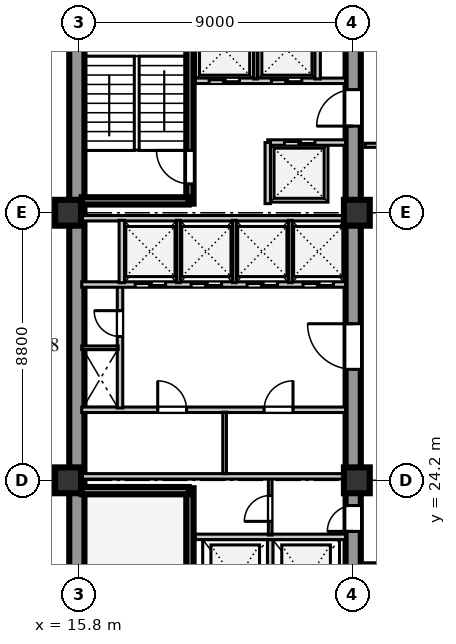
"""IFC4 building model, lengths in metres.
Left out: names, types, materials, properties, quantities, classifications, styles, units other than length and angle.
Written with IfcOpenShell. Run it as: python <this file> out.ifc"""

import sys

from ifc_helpers import new_model, si_unit, direction, frame, frame_2d, origin, origin_2d, place, context, subcontext, project, spatial, rectangle, extrude, element, fill, save


model = new_model("IFC4")
c1 = context("Model", 3, precision=1e-05, world=origin(), true_north=direction((0.0, 1.0)))
c2 = subcontext(c1, "Body", "Model", "MODEL_VIEW")
j1 = project(units=[si_unit("LENGTHUNIT", "METRE"), si_unit("PLANEANGLEUNIT", "RADIAN")], contexts=[c1])
p1 = place(None, origin())
s1 = spatial("IfcSite", under=j1, at=p1, CompositionType="ELEMENT")
p2 = place(p1, origin())
s2 = spatial("IfcBuilding", under=s1, at=p2, CompositionType="ELEMENT")
p3 = place(p2, frame((0.0, 0.0, 188.7)))
s3 = spatial("IfcBuildingStorey", under=s2, at=p3, CompositionType="ELEMENT", Elevation=188.7)
p4 = place(p3, frame((15.74, 15.81, 0.0), z_axis=(0.0, 0.0, 1.0), x_axis=(0.0, 1.0, 0.0)))
e1 = element("IfcWall", 1, at=p4, inside=s3, PredefinedType="SHEAR", context=c2, shape_type="SweptSolid", body=[
    extrude(rectangle(XDim=25.63, YDim=0.5, at=frame_2d((12.815, 0.0))), origin(), (0.0, 0.0, 1.0), 3.6),
])
p5 = place(p3, frame((24.83, 15.74, 0.0), z_axis=(0.0, 0.0, 1.0), x_axis=(0.0, 1.0, 0.0)))
e2 = element("IfcWall", 2, at=p5, inside=s3, PredefinedType="SHEAR", context=c2, shape_type="SweptSolid", body=[
    extrude(rectangle(XDim=25.76, YDim=0.5, at=frame_2d((12.88, 0.0))), origin(), (0.0, 0.0, 1.0), 3.6),
])
p6 = place(p5, frame((1.61, 0.0, 0.0)))
e3 = element("IfcOpeningElement", 3, at=p6, cuts=e2, PredefinedType="OPENING", context=c2, shape_type="SweptSolid", body=[
    extrude(rectangle(XDim=1.2, YDim=2.1, at=frame_2d((0.6, 1.05))), frame((0.0, 0.26, 0.0), z_axis=(0.0, -1.0, 0.0), x_axis=(1.0, 0.0, 0.0)), (0.0, 0.0, 1.0), 0.52),
])
p7 = place(p5, frame((6.78, 0.0, 0.0)))
e4 = element("IfcOpeningElement", 4, at=p7, cuts=e2, PredefinedType="OPENING", context=c2, shape_type="SweptSolid", body=[
    extrude(rectangle(XDim=0.85, YDim=2.06, at=frame_2d((0.425, 1.03))), frame((0.0, 0.26, 0.0), z_axis=(0.0, -1.0, 0.0), x_axis=(1.0, 0.0, 0.0)), (0.0, 0.0, 1.0), 0.52),
])
p8 = place(p5, frame((12.11, 0.0, 0.0)))
e5 = element("IfcOpeningElement", 5, at=p8, cuts=e2, PredefinedType="OPENING", context=c2, shape_type="SweptSolid", body=[
    extrude(rectangle(XDim=1.5, YDim=2.12, at=frame_2d((0.75, 1.06))), frame((0.0, 0.26, 0.0), z_axis=(0.0, -1.0, 0.0), x_axis=(1.0, 0.0, 0.0)), (0.0, 0.0, 1.0), 0.52),
])
p9 = place(p5, frame((20.11, 0.0, 0.0)))
e6 = element("IfcOpeningElement", 6, at=p9, cuts=e2, PredefinedType="OPENING", context=c2, shape_type="SweptSolid", body=[
    extrude(rectangle(XDim=1.2, YDim=2.12, at=frame_2d((0.6, 1.06))), frame((0.0, 0.26, 0.0), z_axis=(0.0, -1.0, 0.0), x_axis=(1.0, 0.0, 0.0)), (0.0, 0.0, 1.0), 0.52),
])
p10 = place(p5, frame((24.01, 0.0, 0.0)))
e7 = element("IfcOpeningElement", 7, at=p10, cuts=e2, PredefinedType="OPENING", context=c2, shape_type="SweptSolid", body=[
    extrude(rectangle(XDim=0.95, YDim=2.1, at=frame_2d((0.475, 1.05))), frame((0.0, 0.26, 0.0), z_axis=(0.0, -1.0, 0.0), x_axis=(1.0, 0.0, 0.0)), (0.0, 0.0, 1.0), 0.52),
])
for number, where, z_axis, x_axis in (
    (8, (15.45, 24.2, 0.0), (0.0, 0.0, 1.0), (1.0, 0.0, 0.0)),
    (9, (15.45, 33.0, 0.0), (0.0, 0.0, 1.0), (1.0, 0.0, 0.0)),
    (10, (24.95, 24.2, 0.0), (0.0, 0.0, 1.0), (1.0, 0.0, 0.0)),
    (11, (24.95, 33.0, 0.0), (0.0, 0.0, 1.0), (1.0, 0.0, 0.0)),
):
    element("IfcColumn", number, at=place(p3, frame(where, z_axis=z_axis, x_axis=x_axis)), inside=s3, PredefinedType="COLUMN", context=c2, shape_type="SweptSolid", body=[
        extrude(rectangle(XDim=0.85, YDim=0.85, at=origin_2d()), origin(), (0.0, 0.0, 1.0), 3.6),
    ])
p11 = place(p3, frame((19.46, 15.74, 0.0), z_axis=(0.0, 0.0, 1.0), x_axis=(0.0, 1.0, 0.0)))
e12 = element("IfcWall", 12, at=p11, inside=s3, PredefinedType="SHEAR", context=c2, shape_type="SweptSolid", body=[
    extrude(rectangle(XDim=8.2, YDim=0.24, at=frame_2d((4.1, 0.0))), origin(), (0.0, 0.0, 1.0), 3.85),
])
p12 = place(p11, frame((0.45, 0.0, 0.0)))
e13 = element("IfcOpeningElement", 13, at=p12, cuts=e12, PredefinedType="OPENING", context=c2, shape_type="SweptSolid", body=[
    extrude(rectangle(XDim=1.1, YDim=2.1, at=frame_2d((0.55, 1.05))), frame((0.0, 0.13, 0.0), z_axis=(0.0, -1.0, 0.0), x_axis=(1.0, 0.0, 0.0)), (0.0, 0.0, 1.0), 0.26),
])
p13 = place(p3, frame((15.9, 23.86, 0.0), z_axis=(0.0, 0.0, 1.0), x_axis=(1.0, 0.0, 0.0)))
e14 = element("IfcWall", 14, at=p13, inside=s3, PredefinedType="SHEAR", context=c2, shape_type="SweptSolid", body=[
    extrude(rectangle(XDim=3.52, YDim=0.24, at=frame_2d((1.76, 0.0))), origin(), (0.0, 0.0, 1.0), 3.85),
])
p14 = place(p3, frame((22.1, 19.51, 0.0), z_axis=(0.0, 0.0, 1.0), x_axis=(0.0, 1.0, 0.0)))
e15 = element("IfcWall", 15, at=p14, inside=s3, PredefinedType="SOLIDWALL", context=c2, shape_type="SweptSolid", body=[
    extrude(rectangle(XDim=2.74, YDim=0.18, at=frame_2d((1.37, 0.0))), origin(), (0.0, 0.0, 1.0), 3.6),
])
p15 = place(p3, frame((19.64, 22.34, 0.0), z_axis=(0.0, 0.0, 1.0), x_axis=(1.0, 0.0, 0.0)))
e16 = element("IfcWall", 16, at=p15, inside=s3, PredefinedType="SOLIDWALL", context=c2, shape_type="SweptSolid", body=[
    extrude(rectangle(XDim=4.94, YDim=0.18, at=frame_2d((2.47, 0.0))), origin(), (0.0, 0.0, 1.0), 3.6),
])
p16 = place(p3, frame((22.1, 22.4, 0.0), z_axis=(0.0, 0.0, 1.0), x_axis=(0.0, 1.0, 0.0)))
e17 = element("IfcWall", 17, at=p16, inside=s3, PredefinedType="PARTITIONING", context=c2, shape_type="SweptSolid", body=[
    extrude(rectangle(XDim=1.88, YDim=0.12, at=frame_2d((0.94, 0.0))), origin(), (0.0, 0.0, 1.0), 3.6),
])
p17 = place(p16, frame((0.45, 0.0, 0.0)))
e18 = element("IfcOpeningElement", 18, at=p17, cuts=e17, PredefinedType="OPENING", context=c2, shape_type="SweptSolid", body=[
    extrude(rectangle(XDim=0.85, YDim=2.06, at=frame_2d((0.425, 1.03))), frame((0.0, 0.07, 0.0), z_axis=(0.0, -1.0, 0.0), x_axis=(1.0, 0.0, 0.0)), (0.0, 0.0, 1.0), 0.14),
])
p18 = place(p3, frame((15.9, 26.52, 0.0), z_axis=(0.0, 0.0, 1.0), x_axis=(1.0, 0.0, 0.0)))
e19 = element("IfcWall", 19, at=p18, inside=s3, PredefinedType="SOLIDWALL", context=c2, shape_type="SweptSolid", body=[
    extrude(rectangle(XDim=8.68, YDim=0.18, at=frame_2d((4.34, 0.0))), origin(), (0.0, 0.0, 1.0), 3.6),
])
p19 = place(p18, frame((2.5, 0.0, 0.0)))
e20 = element("IfcOpeningElement", 20, at=p19, cuts=e19, PredefinedType="OPENING", context=c2, shape_type="SweptSolid", body=[
    extrude(rectangle(XDim=0.95, YDim=2.1, at=frame_2d((0.475, 1.05))), frame((0.0, 0.1, 0.0), z_axis=(0.0, -1.0, 0.0), x_axis=(1.0, 0.0, 0.0)), (0.0, 0.0, 1.0), 0.2),
])
p20 = place(p18, frame((6.0, 0.0, 0.0)))
e21 = element("IfcOpeningElement", 21, at=p20, cuts=e19, PredefinedType="OPENING", context=c2, shape_type="SweptSolid", body=[
    extrude(rectangle(XDim=0.95, YDim=2.1, at=frame_2d((0.475, 1.05))), frame((0.0, 0.1, 0.0), z_axis=(0.0, -1.0, 0.0), x_axis=(1.0, 0.0, 0.0)), (0.0, 0.0, 1.0), 0.2),
])
p21 = place(p3, frame((15.9, 24.33, 0.0), z_axis=(0.0, 0.0, 1.0), x_axis=(1.0, 0.0, 0.0)))
e22 = element("IfcWall", 22, at=p21, inside=s3, PredefinedType="SOLIDWALL", context=c2, shape_type="SweptSolid", body=[
    extrude(rectangle(XDim=8.68, YDim=0.18, at=frame_2d((4.34, 0.0))), origin(), (0.0, 0.0, 1.0), 2.95),
])
p22 = place(p3, frame((20.6, 24.42, 0.0), z_axis=(0.0, 0.0, 1.0), x_axis=(0.0, 1.0, 0.0)))
e23 = element("IfcWall", 23, at=p22, inside=s3, PredefinedType="PARTITIONING", context=c2, shape_type="SweptSolid", body=[
    extrude(rectangle(XDim=2.02, YDim=0.12, at=frame_2d((1.01, 0.0))), origin(), (0.0, 0.0, 1.0), 3.6),
])
p23 = place(p3, frame((17.16, 26.58, 0.0), z_axis=(0.0, 0.0, 1.0), x_axis=(0.0, 1.0, 0.0)))
e24 = element("IfcWall", 24, at=p23, inside=s3, PredefinedType="SOLIDWALL", context=c2, shape_type="SweptSolid", body=[
    extrude(rectangle(XDim=4.02, YDim=0.18, at=frame_2d((2.01, 0.0))), origin(), (0.0, 0.0, 1.0), 3.6),
])
p24 = place(p23, frame((2.35, 0.0, 0.0)))
e25 = element("IfcOpeningElement", 25, at=p24, cuts=e24, PredefinedType="OPENING", context=c2, shape_type="SweptSolid", body=[
    extrude(rectangle(XDim=0.85, YDim=2.06, at=frame_2d((0.425, 1.03))), frame((0.0, 0.1, 0.0), z_axis=(0.0, -1.0, 0.0), x_axis=(1.0, 0.0, 0.0)), (0.0, 0.0, 1.0), 0.2),
])
p25 = place(p3, frame((15.9, 28.56, 0.0), z_axis=(0.0, 0.0, 1.0), x_axis=(1.0, 0.0, 0.0)))
e26 = element("IfcWall", 26, at=p25, inside=s3, PredefinedType="PARTITIONING", context=c2, shape_type="SweptSolid", body=[
    extrude(rectangle(XDim=1.2, YDim=0.12, at=frame_2d((0.6, 0.0))), origin(), (0.0, 0.0, 1.0), 3.6),
])
p26 = place(p3, frame((15.9, 30.64, 0.0), z_axis=(0.0, 0.0, 1.0), x_axis=(1.0, 0.0, 0.0)))
e27 = element("IfcWall", 27, at=p26, inside=s3, PredefinedType="SOLIDWALL", context=c2, shape_type="SweptSolid", body=[
    extrude(rectangle(XDim=8.68, YDim=0.18, at=frame_2d((4.34, 0.0))), origin(), (0.0, 0.0, 1.0), 3.6),
])
p27 = place(p26, frame((1.76, 0.0, 0.0)))
e28 = element("IfcOpeningElement", 28, at=p27, cuts=e27, PredefinedType="OPENING", context=c2, shape_type="SweptSolid", body=[
    extrude(rectangle(XDim=1.0, YDim=2.1, at=frame_2d((0.5, 1.05))), frame((0.0, 0.1, 0.0), z_axis=(0.0, -1.0, 0.0), x_axis=(1.0, 0.0, 0.0)), (0.0, 0.0, 1.0), 0.2),
])
p28 = place(p26, frame((3.6, 0.0, 0.0)))
e29 = element("IfcOpeningElement", 29, at=p28, cuts=e27, PredefinedType="OPENING", context=c2, shape_type="SweptSolid", body=[
    extrude(rectangle(XDim=1.0, YDim=2.1, at=frame_2d((0.5, 1.05))), frame((0.0, 0.1, 0.0), z_axis=(0.0, -1.0, 0.0), x_axis=(1.0, 0.0, 0.0)), (0.0, 0.0, 1.0), 0.2),
])
p29 = place(p26, frame((5.44, 0.0, 0.0)))
e30 = element("IfcOpeningElement", 30, at=p29, cuts=e27, PredefinedType="OPENING", context=c2, shape_type="SweptSolid", body=[
    extrude(rectangle(XDim=1.0, YDim=2.1, at=frame_2d((0.5, 1.05))), frame((0.0, 0.1, 0.0), z_axis=(0.0, -1.0, 0.0), x_axis=(1.0, 0.0, 0.0)), (0.0, 0.0, 1.0), 0.2),
])
p30 = place(p26, frame((7.28, 0.0, 0.0)))
e31 = element("IfcOpeningElement", 31, at=p30, cuts=e27, PredefinedType="OPENING", context=c2, shape_type="SweptSolid", body=[
    extrude(rectangle(XDim=1.0, YDim=2.1, at=frame_2d((0.5, 1.05))), frame((0.0, 0.1, 0.0), z_axis=(0.0, -1.0, 0.0), x_axis=(1.0, 0.0, 0.0)), (0.0, 0.0, 1.0), 0.2),
])
p31 = place(p3, frame((15.9, 32.82, 0.0), z_axis=(0.0, 0.0, 1.0), x_axis=(1.0, 0.0, 0.0)))
e32 = element("IfcWall", 32, at=p31, inside=s3, PredefinedType="SOLIDWALL", context=c2, shape_type="SweptSolid", body=[
    extrude(rectangle(XDim=8.68, YDim=0.18, at=frame_2d((4.34, 0.0))), origin(), (0.0, 0.0, 1.0), 2.95),
])
p32 = place(p3, frame((17.22, 30.7, 0.0), z_axis=(0.0, 0.0, 1.0), x_axis=(0.0, 1.0, 0.0)))
e33 = element("IfcWall", 33, at=p32, inside=s3, PredefinedType="SOLIDWALL", context=c2, shape_type="SweptSolid", body=[
    extrude(rectangle(XDim=2.05, YDim=0.18, at=frame_2d((1.025, 0.0))), origin(), (0.0, 0.0, 1.0), 3.6),
])
for number, where, z_axis, x_axis in (
    (34, (19.08, 30.7, 0.0), (0.0, 0.0, 1.0), (0.0, 1.0, 0.0)),
    (35, (20.92, 30.7, 0.0), (0.0, 0.0, 1.0), (0.0, 1.0, 0.0)),
    (36, (22.76, 30.7, 0.0), (0.0, 0.0, 1.0), (0.0, 1.0, 0.0)),
):
    element("IfcWall", number, at=place(p3, frame(where, z_axis=z_axis, x_axis=x_axis)), inside=s3, PredefinedType="PARTITIONING", context=c2, shape_type="SweptSolid", body=[
        extrude(rectangle(XDim=2.05, YDim=0.12, at=frame_2d((1.025, 0.0))), origin(), (0.0, 0.0, 1.0), 3.6),
    ])
p33 = place(p3, frame((19.46, 33.3, 0.0), z_axis=(0.0, 0.0, 1.0), x_axis=(0.0, 1.0, 0.0)))
e37 = element("IfcWall", 37, at=p33, inside=s3, PredefinedType="SHEAR", context=c2, shape_type="SweptSolid", body=[
    extrude(rectangle(XDim=8.18, YDim=0.24, at=frame_2d((4.09, 0.0))), origin(), (0.0, 0.0, 1.0), 3.85),
])
p34 = place(p33, frame((0.65, 0.0, 0.0)))
e38 = element("IfcOpeningElement", 38, at=p34, cuts=e37, PredefinedType="OPENING", context=c2, shape_type="SweptSolid", body=[
    extrude(rectangle(XDim=1.1, YDim=2.1, at=frame_2d((0.55, 1.05))), frame((0.0, 0.13, 0.0), z_axis=(0.0, -1.0, 0.0), x_axis=(1.0, 0.0, 0.0)), (0.0, 0.0, 1.0), 0.26),
])
p35 = place(p3, frame((15.9, 33.39, 0.0), z_axis=(0.0, 0.0, 1.0), x_axis=(1.0, 0.0, 0.0)))
e39 = element("IfcWall", 39, at=p35, inside=s3, PredefinedType="SHEAR", context=c2, shape_type="SweptSolid", body=[
    extrude(rectangle(XDim=3.52, YDim=0.24, at=frame_2d((1.76, 0.0))), origin(), (0.0, 0.0, 1.0), 3.85),
])
p36 = place(p3, frame((22.02, 35.31, 0.0), z_axis=(0.0, 0.0, 1.0), x_axis=(1.0, 0.0, 0.0)))
e40 = element("IfcWall", 40, at=p36, inside=s3, PredefinedType="SOLIDWALL", context=c2, shape_type="SweptSolid", body=[
    extrude(rectangle(XDim=2.56, YDim=0.18, at=frame_2d((1.28, 0.0))), origin(), (0.0, 0.0, 1.0), 3.6),
])
p37 = place(p36, frame((0.55, 0.0, 0.0)))
e41 = element("IfcOpeningElement", 41, at=p37, cuts=e40, PredefinedType="OPENING", context=c2, shape_type="SweptSolid", body=[
    extrude(rectangle(XDim=1.0, YDim=2.1, at=frame_2d((0.5, 1.05))), frame((0.0, 0.1, 0.0), z_axis=(0.0, -1.0, 0.0), x_axis=(1.0, 0.0, 0.0)), (0.0, 0.0, 1.0), 0.2),
])
p38 = place(p3, frame((22.02, 33.3, 0.0), z_axis=(0.0, 0.0, 1.0), x_axis=(0.0, 1.0, 0.0)))
e42 = element("IfcWall", 42, at=p38, inside=s3, PredefinedType="SOLIDWALL", context=c2, shape_type="SweptSolid", body=[
    extrude(rectangle(XDim=2.01, YDim=0.18, at=frame_2d((1.005, 0.0))), origin(), (0.0, 0.0, 1.0), 3.6),
])
p39 = place(p3, frame((19.64, 37.34, 0.0), z_axis=(0.0, 0.0, 1.0), x_axis=(1.0, 0.0, 0.0)))
e43 = element("IfcWall", 43, at=p39, inside=s3, PredefinedType="SOLIDWALL", context=c2, shape_type="SweptSolid", body=[
    extrude(rectangle(XDim=4.94, YDim=0.18, at=frame_2d((2.47, 0.0))), origin(), (0.0, 0.0, 1.0), 3.6),
])
p40 = place(p39, frame((0.45, 0.0, 0.0)))
e44 = element("IfcOpeningElement", 44, at=p40, cuts=e43, PredefinedType="OPENING", context=c2, shape_type="SweptSolid", body=[
    extrude(rectangle(XDim=1.0, YDim=2.1, at=frame_2d((0.5, 1.05))), frame((0.0, 0.1, 0.0), z_axis=(0.0, -1.0, 0.0), x_axis=(1.0, 0.0, 0.0)), (0.0, 0.0, 1.0), 0.2),
])
p41 = place(p39, frame((2.5, 0.0, 0.0)))
e45 = element("IfcOpeningElement", 45, at=p41, cuts=e43, PredefinedType="OPENING", context=c2, shape_type="SweptSolid", body=[
    extrude(rectangle(XDim=1.0, YDim=2.1, at=frame_2d((0.5, 1.05))), frame((0.0, 0.1, 0.0), z_axis=(0.0, -1.0, 0.0), x_axis=(1.0, 0.0, 0.0)), (0.0, 0.0, 1.0), 0.2),
])
p42 = place(p3, frame((21.62, 37.4, 0.0), z_axis=(0.0, 0.0, 1.0), x_axis=(0.0, 1.0, 0.0)))
e46 = element("IfcWall", 46, at=p42, inside=s3, PredefinedType="PARTITIONING", context=c2, shape_type="SweptSolid", body=[
    extrude(rectangle(XDim=1.9, YDim=0.12, at=frame_2d((0.95, 0.0))), origin(), (0.0, 0.0, 1.0), 3.6),
])
p43 = place(p3, frame((23.66, 37.4, 0.0), z_axis=(0.0, 0.0, 1.0), x_axis=(0.0, 1.0, 0.0)))
e47 = element("IfcWall", 47, at=p43, inside=s3, PredefinedType="SOLIDWALL", context=c2, shape_type="SweptSolid", body=[
    extrude(rectangle(XDim=1.9, YDim=0.18, at=frame_2d((0.95, 0.0))), origin(), (0.0, 0.0, 1.0), 3.6),
])
p44 = place(p3, frame((25.22, 21.42, 0.0), z_axis=(0.0, 0.0, 1.0), x_axis=(1.0, 0.0, 0.0)))
e48 = element("IfcWall", 48, at=p44, inside=s3, PredefinedType="PARTITIONING", context=c2, shape_type="SweptSolid", body=[
    extrude(rectangle(XDim=15.6, YDim=0.135, at=frame_2d((7.8, 0.0))), origin(), (0.0, 0.0, 1.0), 3.25),
])
p45 = place(p44, frame((0.73, 0.0, 0.0)))
e49 = element("IfcOpeningElement", 49, at=p45, cuts=e48, PredefinedType="OPENING", context=c2, shape_type="SweptSolid", body=[
    extrude(rectangle(XDim=0.95, YDim=2.1, at=frame_2d((0.475, 1.05))), frame((0.0, 0.078, 0.0), z_axis=(0.0, -1.0, 0.0), x_axis=(1.0, 0.0, 0.0)), (0.0, 0.0, 1.0), 0.155),
])
p46 = place(p44, frame((9.43, 0.0, 0.0)))
e50 = element("IfcOpeningElement", 50, at=p46, cuts=e48, PredefinedType="OPENING", context=c2, shape_type="SweptSolid", body=[
    extrude(rectangle(XDim=0.95, YDim=2.1, at=frame_2d((0.475, 1.05))), frame((0.0, 0.078, 0.0), z_axis=(0.0, -1.0, 0.0), x_axis=(1.0, 0.0, 0.0)), (0.0, 0.0, 1.0), 0.155),
])
p47 = place(p3, frame((25.22, 35.22, 0.0), z_axis=(0.0, 0.0, 1.0), x_axis=(1.0, 0.0, 0.0)))
e51 = element("IfcWall", 51, at=p47, inside=s3, PredefinedType="PARTITIONING", context=c2, shape_type="SweptSolid", body=[
    extrude(rectangle(XDim=9.5, YDim=0.135, at=frame_2d((4.75, 0.0))), origin(), (0.0, 0.0, 1.0), 3.6),
])
p48 = place(p47, frame((1.2, 0.0, 0.0)))
e52 = element("IfcOpeningElement", 52, at=p48, cuts=e51, PredefinedType="OPENING", context=c2, shape_type="SweptSolid", body=[
    extrude(rectangle(XDim=0.95, YDim=2.1, at=frame_2d((0.475, 1.05))), frame((0.0, 0.078, 0.0), z_axis=(0.0, -1.0, 0.0), x_axis=(1.0, 0.0, 0.0)), (0.0, 0.0, 1.0), 0.155),
])
p49 = place(p17, origin())
e53 = element("IfcDoor", 53, at=p49, inside=s3, OperationType="SINGLE_SWING_LEFT", PredefinedType="DOOR", context=c2, shape_type="SweptSolid", body=[
    extrude(rectangle(XDim=0.85, YDim=2.06, at=frame_2d((0.425, 1.03))), frame((0.0, 0.025, 0.0), z_axis=(0.0, -1.0, 0.0), x_axis=(1.0, 0.0, 0.0)), (0.0, 0.0, 1.0), 0.05),
])
fill(e18, e53)
p50 = place(p7, frame((0.85, 0.0, 0.0), z_axis=(0.0, 0.0, 1.0), x_axis=(-1.0, 0.0, 0.0)))
e54 = element("IfcDoor", 54, at=p50, inside=s3, OperationType="SINGLE_SWING_RIGHT", PredefinedType="DOOR", context=c2, shape_type="SweptSolid", body=[
    extrude(rectangle(XDim=0.85, YDim=2.06, at=frame_2d((0.425, 1.03))), frame((0.0, 0.025, 0.0), z_axis=(0.0, -1.0, 0.0), x_axis=(1.0, 0.0, 0.0)), (0.0, 0.0, 1.0), 0.05),
])
fill(e4, e54)
p51 = place(p19, origin())
e55 = element("IfcDoor", 55, at=p51, inside=s3, OperationType="SINGLE_SWING_LEFT", PredefinedType="DOOR", context=c2, shape_type="SweptSolid", body=[
    extrude(rectangle(XDim=0.95, YDim=2.1, at=frame_2d((0.475, 1.05))), frame((0.0, 0.025, 0.0), z_axis=(0.0, -1.0, 0.0), x_axis=(1.0, 0.0, 0.0)), (0.0, 0.0, 1.0), 0.05),
])
fill(e20, e55)
p52 = place(p20, origin())
e56 = element("IfcDoor", 56, at=p52, inside=s3, OperationType="SINGLE_SWING_RIGHT", PredefinedType="DOOR", context=c2, shape_type="SweptSolid", body=[
    extrude(rectangle(XDim=0.95, YDim=2.1, at=frame_2d((0.475, 1.05))), frame((0.0, 0.025, 0.0), z_axis=(0.0, -1.0, 0.0), x_axis=(1.0, 0.0, 0.0)), (0.0, 0.0, 1.0), 0.05),
])
fill(e21, e56)
p53 = place(p24, origin())
e57 = element("IfcDoor", 57, at=p53, inside=s3, OperationType="SINGLE_SWING_RIGHT", PredefinedType="DOOR", context=c2, shape_type="SweptSolid", body=[
    extrude(rectangle(XDim=0.85, YDim=2.06, at=frame_2d((0.425, 1.03))), frame((0.0, 0.025, 0.0), z_axis=(0.0, -1.0, 0.0), x_axis=(1.0, 0.0, 0.0)), (0.0, 0.0, 1.0), 0.05),
])
fill(e25, e57)
p54 = place(p8, frame((1.5, 0.0, 0.0), z_axis=(0.0, 0.0, 1.0), x_axis=(-1.0, 0.0, 0.0)))
e58 = element("IfcDoor", 58, at=p54, inside=s3, OperationType="SINGLE_SWING_LEFT", PredefinedType="DOOR", context=c2, shape_type="SweptSolid", body=[
    extrude(rectangle(XDim=1.5, YDim=2.12, at=frame_2d((0.75, 1.06))), frame((0.0, 0.025, 0.0), z_axis=(0.0, -1.0, 0.0), x_axis=(1.0, 0.0, 0.0)), (0.0, 0.0, 1.0), 0.05),
])
fill(e5, e58)
p55 = place(p27, frame((1.0, 0.0, 0.0), z_axis=(0.0, 0.0, 1.0), x_axis=(-1.0, 0.0, 0.0)))
e59 = element("IfcDoor", 59, at=p55, inside=s3, OperationType="DOUBLE_DOOR_SLIDING", PredefinedType="DOOR", context=c2, shape_type="SweptSolid", body=[
    extrude(rectangle(XDim=1.0, YDim=2.1, at=frame_2d((0.5, 1.05))), frame((0.0, 0.025, 0.0), z_axis=(0.0, -1.0, 0.0), x_axis=(1.0, 0.0, 0.0)), (0.0, 0.0, 1.0), 0.05),
])
fill(e28, e59)
p56 = place(p28, frame((1.0, 0.0, 0.0), z_axis=(0.0, 0.0, 1.0), x_axis=(-1.0, 0.0, 0.0)))
e60 = element("IfcDoor", 60, at=p56, inside=s3, OperationType="DOUBLE_DOOR_SLIDING", PredefinedType="DOOR", context=c2, shape_type="SweptSolid", body=[
    extrude(rectangle(XDim=1.0, YDim=2.1, at=frame_2d((0.5, 1.05))), frame((0.0, 0.025, 0.0), z_axis=(0.0, -1.0, 0.0), x_axis=(1.0, 0.0, 0.0)), (0.0, 0.0, 1.0), 0.05),
])
fill(e29, e60)
p57 = place(p29, frame((1.0, 0.0, 0.0), z_axis=(0.0, 0.0, 1.0), x_axis=(-1.0, 0.0, 0.0)))
e61 = element("IfcDoor", 61, at=p57, inside=s3, OperationType="DOUBLE_DOOR_SLIDING", PredefinedType="DOOR", context=c2, shape_type="SweptSolid", body=[
    extrude(rectangle(XDim=1.0, YDim=2.1, at=frame_2d((0.5, 1.05))), frame((0.0, 0.025, 0.0), z_axis=(0.0, -1.0, 0.0), x_axis=(1.0, 0.0, 0.0)), (0.0, 0.0, 1.0), 0.05),
])
fill(e30, e61)
p58 = place(p30, frame((1.0, 0.0, 0.0), z_axis=(0.0, 0.0, 1.0), x_axis=(-1.0, 0.0, 0.0)))
e62 = element("IfcDoor", 62, at=p58, inside=s3, OperationType="DOUBLE_DOOR_SLIDING", PredefinedType="DOOR", context=c2, shape_type="SweptSolid", body=[
    extrude(rectangle(XDim=1.0, YDim=2.1, at=frame_2d((0.5, 1.05))), frame((0.0, 0.025, 0.0), z_axis=(0.0, -1.0, 0.0), x_axis=(1.0, 0.0, 0.0)), (0.0, 0.0, 1.0), 0.05),
])
fill(e31, e62)
p59 = place(p34, origin())
e63 = element("IfcDoor", 63, at=p59, inside=s3, OperationType="SINGLE_SWING_RIGHT", PredefinedType="DOOR", context=c2, shape_type="SweptSolid", body=[
    extrude(rectangle(XDim=1.1, YDim=2.1, at=frame_2d((0.55, 1.05))), frame((0.0, 0.025, 0.0), z_axis=(0.0, -1.0, 0.0), x_axis=(1.0, 0.0, 0.0)), (0.0, 0.0, 1.0), 0.05),
])
fill(e38, e63)
p60 = place(p9, frame((1.2, 0.0, 0.0), z_axis=(0.0, 0.0, 1.0), x_axis=(-1.0, 0.0, 0.0)))
e64 = element("IfcDoor", 64, at=p60, inside=s3, OperationType="SINGLE_SWING_RIGHT", PredefinedType="DOOR", context=c2, shape_type="SweptSolid", body=[
    extrude(rectangle(XDim=1.2, YDim=2.12, at=frame_2d((0.6, 1.06))), frame((0.0, 0.025, 0.0), z_axis=(0.0, -1.0, 0.0), x_axis=(1.0, 0.0, 0.0)), (0.0, 0.0, 1.0), 0.05),
])
fill(e6, e64)
p61 = place(p40, frame((1.0, 0.0, 0.0), z_axis=(0.0, 0.0, 1.0), x_axis=(-1.0, 0.0, 0.0)))
e65 = element("IfcDoor", 65, at=p61, inside=s3, OperationType="DOUBLE_DOOR_SLIDING", PredefinedType="DOOR", context=c2, shape_type="SweptSolid", body=[
    extrude(rectangle(XDim=1.0, YDim=2.1, at=frame_2d((0.5, 1.05))), frame((0.0, 0.025, 0.0), z_axis=(0.0, -1.0, 0.0), x_axis=(1.0, 0.0, 0.0)), (0.0, 0.0, 1.0), 0.05),
])
fill(e44, e65)
p62 = place(p41, frame((1.0, 0.0, 0.0), z_axis=(0.0, 0.0, 1.0), x_axis=(-1.0, 0.0, 0.0)))
e66 = element("IfcDoor", 66, at=p62, inside=s3, OperationType="DOUBLE_DOOR_SLIDING", PredefinedType="DOOR", context=c2, shape_type="SweptSolid", body=[
    extrude(rectangle(XDim=1.0, YDim=2.1, at=frame_2d((0.5, 1.05))), frame((0.0, 0.025, 0.0), z_axis=(0.0, -1.0, 0.0), x_axis=(1.0, 0.0, 0.0)), (0.0, 0.0, 1.0), 0.05),
])
fill(e45, e66)
p63 = place(p37, origin())
e67 = element("IfcDoor", 67, at=p63, inside=s3, OperationType="DOUBLE_DOOR_SLIDING", PredefinedType="DOOR", context=c2, shape_type="SweptSolid", body=[
    extrude(rectangle(XDim=1.0, YDim=2.1, at=frame_2d((0.5, 1.05))), frame((0.0, 0.025, 0.0), z_axis=(0.0, -1.0, 0.0), x_axis=(1.0, 0.0, 0.0)), (0.0, 0.0, 1.0), 0.05),
])
fill(e41, e67)
save(model, sys.argv[1])
